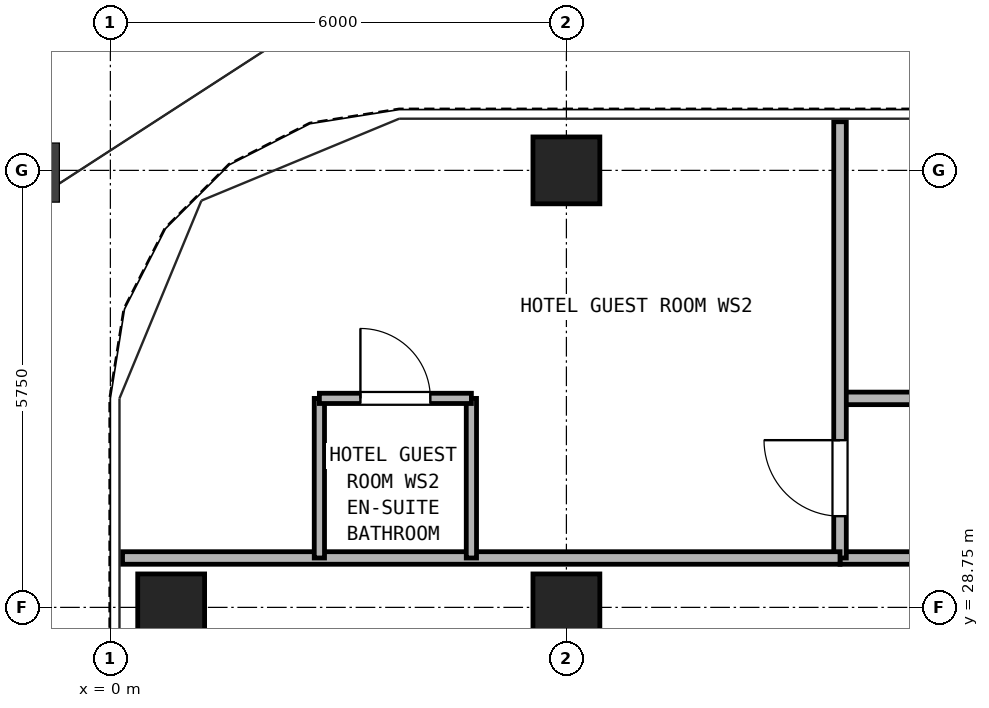
"""IFC4 building model, lengths in metres.
Left out: names, types, materials, properties, quantities, classifications, styles, units other than length and angle.
Written with IfcOpenShell. Run it as: python <this file> out.ifc"""

import sys

from ifc_helpers import new_model, si_unit, direction, frame, frame_2d, origin, origin_2d, place, context, subcontext, project, spatial, rectangle, hollow_rectangle, extrude, source, transform, mapped, element, fill, save


model = new_model("IFC4")
c1 = context("Model", 3, precision=1e-05, world=origin(), true_north=direction((0.0, 1.0)))
c2 = subcontext(c1, "Body", "Model", "MODEL_VIEW")
j1 = project(units=[si_unit("LENGTHUNIT", "METRE"), si_unit("PLANEANGLEUNIT", "RADIAN")], contexts=[c1])
p1 = place(None, origin())
s1 = spatial("IfcSite", under=j1, at=p1, CompositionType="ELEMENT")
p2 = place(p1, origin())
s2 = spatial("IfcBuilding", under=s1, at=p2, CompositionType="ELEMENT")
p3 = place(p2, frame((0.0, 0.0, 124.7)))
s3 = spatial("IfcBuildingStorey", under=s2, at=p3, CompositionType="ELEMENT", Elevation=124.7)
m1 = source(origin(), c2, "Body", "SweptSolid", [
    extrude(hollow_rectangle(XDim=0.88, YDim=0.88, WallThickness=0.05, at=origin_2d()), origin(), (0.0, 0.0, 1.0), 2.95),
])
for number, where, z_axis, x_axis in (
    (1, (6.0, 34.5, 0.0), (0.0, 0.0, 1.0), (1.0, 0.0, 0.0)),
    (2, (0.8, 28.75, 0.0), (0.0, 0.0, 1.0), (1.0, 0.0, 0.0)),
    (3, (6.0, 28.75, 0.0), (0.0, 0.0, 1.0), (1.0, 0.0, 0.0)),
):
    element("IfcColumn", number, at=place(p3, frame(where, z_axis=z_axis, x_axis=x_axis)), inside=s3, PredefinedType="COLUMN", context=c2, shape_type="MappedRepresentation", body=[
        mapped(m1, transform((0.0, 0.0, 0.0), x_axis=(1.0, 0.0, 0.0), y_axis=(0.0, 1.0, 0.0), z_axis=(0.0, 0.0, 1.0), scale=1.0)),
    ])
p4 = place(p3, frame((9.6, 31.5, 0.0), z_axis=(0.0, 0.0, 1.0), x_axis=(1.0, 0.0, 0.0)))
e4 = element("IfcWall", 4, at=p4, inside=s3, PredefinedType="PARTITIONING", context=c2, shape_type="SweptSolid", body=[
    extrude(rectangle(XDim=27.8, YDim=0.165, at=frame_2d((13.9, 0.0))), origin(), (0.0, 0.0, 1.0), 2.583),
])
p5 = place(p4, frame((2.7, 0.0, 0.0)))
e5 = element("IfcOpeningElement", 5, at=p5, cuts=e4, PredefinedType="OPENING", context=c2, shape_type="SweptSolid", body=[
    extrude(rectangle(XDim=0.95, YDim=2.15, at=frame_2d((0.475, 1.075))), frame((0.0, 0.093, 0.0), z_axis=(0.0, -1.0, 0.0), x_axis=(1.0, 0.0, 0.0)), (0.0, 0.0, 1.0), 0.185),
])
p6 = place(p4, frame((9.4, 0.0, 0.0)))
e6 = element("IfcOpeningElement", 6, at=p6, cuts=e4, PredefinedType="OPENING", context=c2, shape_type="SweptSolid", body=[
    extrude(rectangle(XDim=0.95, YDim=2.15, at=frame_2d((0.475, 1.075))), frame((0.0, 0.093, 0.0), z_axis=(0.0, -1.0, 0.0), x_axis=(1.0, 0.0, 0.0)), (0.0, 0.0, 1.0), 0.185),
])
p7 = place(p4, frame((16.15, 0.0, 0.0)))
e7 = element("IfcOpeningElement", 7, at=p7, cuts=e4, PredefinedType="OPENING", context=c2, shape_type="SweptSolid", body=[
    extrude(rectangle(XDim=0.95, YDim=2.15, at=frame_2d((0.475, 1.075))), frame((0.0, 0.093, 0.0), z_axis=(0.0, -1.0, 0.0), x_axis=(1.0, 0.0, 0.0)), (0.0, 0.0, 1.0), 0.185),
])
p8 = place(p4, frame((21.75, 0.0, 0.0)))
e8 = element("IfcOpeningElement", 8, at=p8, cuts=e4, PredefinedType="OPENING", context=c2, shape_type="SweptSolid", body=[
    extrude(rectangle(XDim=0.95, YDim=2.15, at=frame_2d((0.475, 1.075))), frame((0.0, 0.093, 0.0), z_axis=(0.0, -1.0, 0.0), x_axis=(1.0, 0.0, 0.0)), (0.0, 0.0, 1.0), 0.185),
])
p9 = place(p4, frame((25.7, 0.0, 0.0)))
e9 = element("IfcOpeningElement", 9, at=p9, cuts=e4, PredefinedType="OPENING", context=c2, shape_type="SweptSolid", body=[
    extrude(rectangle(XDim=0.92, YDim=2.1, at=frame_2d((0.46, 1.05))), frame((0.0, 0.093, 0.0), z_axis=(0.0, -1.0, 0.0), x_axis=(1.0, 0.0, 0.0)), (0.0, 0.0, 1.0), 0.185),
])
p10 = place(p3, frame((9.6, 29.4, 0.0), z_axis=(0.0, 0.0, 1.0), x_axis=(1.0, 0.0, 0.0)))
e10 = element("IfcWall", 10, at=p10, inside=s3, PredefinedType="PARTITIONING", context=c2, shape_type="SweptSolid", body=[
    extrude(rectangle(XDim=6.7, YDim=0.165, at=frame_2d((3.35, 0.0))), origin(), (0.0, 0.0, 1.0), 2.95),
])
p11 = place(p3, frame((9.6, 29.4, 0.0), z_axis=(0.0, 0.0, 1.0), x_axis=(0.0, 1.0, 0.0)))
e11 = element("IfcWall", 11, at=p11, inside=s3, PredefinedType="PARTITIONING", context=c2, shape_type="SweptSolid", body=[
    extrude(rectangle(XDim=5.74, YDim=0.165, at=frame_2d((2.87, 0.0))), origin(), (0.0, 0.0, 1.0), 2.95),
])
p12 = place(p11, frame((0.55, 0.0, 0.0)))
e12 = element("IfcOpeningElement", 12, at=p12, cuts=e11, PredefinedType="OPENING", context=c2, shape_type="SweptSolid", body=[
    extrude(rectangle(XDim=1.0, YDim=2.15, at=frame_2d((0.5, 1.075))), frame((0.0, 0.093, 0.0), z_axis=(0.0, -1.0, 0.0), x_axis=(1.0, 0.0, 0.0)), (0.0, 0.0, 1.0), 0.185),
])
p13 = place(p3, frame((0.16, 29.4, 0.0), z_axis=(0.0, 0.0, 1.0), x_axis=(1.0, 0.0, 0.0)))
e13 = element("IfcWall", 13, at=p13, inside=s3, PredefinedType="PARTITIONING", context=c2, shape_type="SweptSolid", body=[
    extrude(rectangle(XDim=9.44, YDim=0.165, at=frame_2d((4.72, 0.0))), origin(), (0.0, 0.0, 1.0), 2.95),
])
for number, where, z_axis, x_axis in (
    (14, (2.75, 29.4, 0.0), (0.0, 0.0, 1.0), (0.0, 1.0, 0.0)),
    (15, (4.75, 29.4, 0.0), (0.0, 0.0, 1.0), (0.0, 1.0, 0.0)),
):
    element("IfcWall", number, at=place(p3, frame(where, z_axis=z_axis, x_axis=x_axis)), inside=s3, PredefinedType="PARTITIONING", context=c2, shape_type="SweptSolid", body=[
        extrude(rectangle(XDim=2.1, YDim=0.135, at=frame_2d((1.05, 0.0))), origin(), (0.0, 0.0, 1.0), 2.95),
    ])
p14 = place(p3, frame((2.75, 31.5, 0.0), z_axis=(0.0, 0.0, 1.0), x_axis=(1.0, 0.0, 0.0)))
e16 = element("IfcWall", 16, at=p14, inside=s3, PredefinedType="PARTITIONING", context=c2, shape_type="SweptSolid", body=[
    extrude(rectangle(XDim=2.0, YDim=0.135, at=frame_2d((1.0, 0.0))), origin(), (0.0, 0.0, 1.0), 2.95),
])
p15 = place(p14, frame((0.54, 0.0, 0.0)))
e17 = element("IfcOpeningElement", 17, at=p15, cuts=e16, PredefinedType="OPENING", context=c2, shape_type="SweptSolid", body=[
    extrude(rectangle(XDim=0.92, YDim=2.1, at=frame_2d((0.46, 1.05))), frame((0.0, 0.077, 0.0), z_axis=(0.0, -1.0, 0.0), x_axis=(1.0, 0.0, 0.0)), (0.0, 0.0, 1.0), 0.155),
])
p16 = place(p15, frame((0.92, 0.0, 0.0), z_axis=(0.0, 0.0, 1.0), x_axis=(-1.0, 0.0, 0.0)))
e18 = element("IfcDoor", 18, at=p16, inside=s3, OperationType="SINGLE_SWING_LEFT", PredefinedType="DOOR", context=c2, shape_type="SweptSolid", body=[
    extrude(rectangle(XDim=0.92, YDim=2.1, at=frame_2d((0.46, 1.05))), frame((0.0, 0.025, 0.0), z_axis=(0.0, -1.0, 0.0), x_axis=(1.0, 0.0, 0.0)), (0.0, 0.0, 1.0), 0.05),
])
fill(e17, e18)
p17 = place(p12, origin())
e19 = element("IfcDoor", 19, at=p17, inside=s3, OperationType="SINGLE_SWING_RIGHT", PredefinedType="DOOR", context=c2, shape_type="SweptSolid", body=[
    extrude(rectangle(XDim=1.0, YDim=2.15, at=frame_2d((0.5, 1.075))), frame((0.0, 0.025, 0.0), z_axis=(0.0, -1.0, 0.0), x_axis=(1.0, 0.0, 0.0)), (0.0, 0.0, 1.0), 0.05),
])
fill(e12, e19)
save(model, sys.argv[1])
